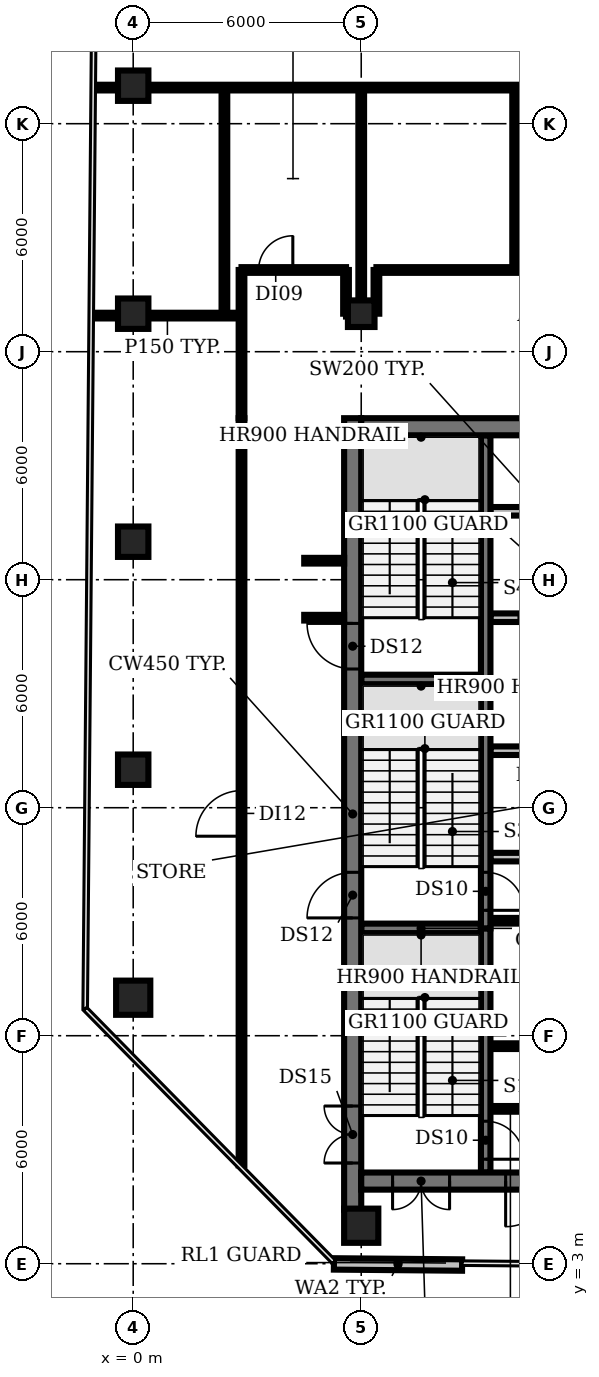
"""IFC4 building model, lengths in metres.
Left out: names, types, materials, properties, quantities, classifications, styles, units other than length and angle.
Written with IfcOpenShell. Run it as: python <this file> out.ifc"""

import sys

from ifc_helpers import new_model, si_unit, direction, frame, frame_2d, origin, origin_2d, place, context, subcontext, project, spatial, rectangle, circle, extrude, element, fill, save


model = new_model("IFC4")
c1 = context("Model", 3, precision=1e-05, world=origin(), true_north=direction((0.0, 1.0)))
c2 = subcontext(c1, "Body", "Model", "MODEL_VIEW")
j1 = project(units=[si_unit("LENGTHUNIT", "METRE"), si_unit("PLANEANGLEUNIT", "RADIAN")], contexts=[c1])
p1 = place(None, origin())
s1 = spatial("IfcSite", under=j1, at=p1, CompositionType="ELEMENT")
p2 = place(p1, origin())
s2 = spatial("IfcBuilding", under=s1, at=p2, CompositionType="ELEMENT")
p3 = place(p2, frame((0.0, 0.0, 230.6)))
s3 = spatial("IfcBuildingStorey", under=s2, at=p3, CompositionType="ELEMENT", Elevation=230.6)
p4 = place(p3, frame((0.0, 10.0, 0.0), z_axis=(0.0, 0.0, 1.0), x_axis=(1.0, 0.0, 0.0)))
e1 = element("IfcColumn", 1, at=p4, inside=s3, PredefinedType="COLUMN", context=c2, shape_type="SweptSolid", body=[
    extrude(circle(Radius=0.45, at=origin_2d()), origin(), (0.0, 0.0, 1.0), 3.85),
])
for number, where, z_axis, x_axis in (
    (2, (0.0, 16.0, 0.0), (0.0, 0.0, 1.0), (1.0, 0.0, 0.0)),
    (3, (0.0, 22.0, 0.0), (0.0, 0.0, 1.0), (1.0, 0.0, 0.0)),
    (4, (0.0, 28.0, 0.0), (0.0, 0.0, 1.0), (1.0, 0.0, 0.0)),
    (5, (0.0, 34.0, 0.0), (0.0, 0.0, 1.0), (1.0, 0.0, 0.0)),
):
    element("IfcColumn", number, at=place(p3, frame(where, z_axis=z_axis, x_axis=x_axis)), inside=s3, PredefinedType="COLUMN", context=c2, shape_type="SweptSolid", body=[
        extrude(rectangle(XDim=0.8, YDim=0.8, at=origin_2d()), origin(), (0.0, 0.0, 1.0), 3.85),
    ])
p5 = place(p3, frame((6.0, 4.0, 0.0), z_axis=(0.0, 0.0, 1.0), x_axis=(1.0, 0.0, 0.0)))
e6 = element("IfcColumn", 6, at=p5, inside=s3, PredefinedType="COLUMN", context=c2, shape_type="SweptSolid", body=[
    extrude(circle(Radius=0.45, at=origin_2d()), origin(), (0.0, 0.0, 1.0), 3.85),
])
p6 = place(p3, frame((6.0, 28.0, 0.0), z_axis=(0.0, 0.0, 1.0), x_axis=(1.0, 0.0, 0.0)))
e7 = element("IfcColumn", 7, at=p6, inside=s3, PredefinedType="COLUMN", context=c2, shape_type="SweptSolid", body=[
    extrude(rectangle(XDim=0.7, YDim=0.7, at=origin_2d()), origin(), (0.0, 0.0, 1.0), 3.85),
])
p7 = place(p3, frame((5.281, 2.995, 0.0), z_axis=(0.0, 0.0, 1.0), x_axis=(0.999962277007, -0.008685882971, 0.0)))
e8 = element("IfcWall", 8, at=p7, inside=s3, PredefinedType="SOLIDWALL", context=c2, shape_type="SweptSolid", body=[
    extrude(rectangle(XDim=3.373, YDim=0.3, at=frame_2d((1.687, 0.0))), origin(), (0.0, 0.0, 1.0), 3.85),
])
for number, where, z_axis, x_axis in (
    (9, (9.4, 7.075, 0.0), (0.0, 0.0, 1.0), (1.0, 0.0, 0.0)),
    (10, (9.4, 8.725, 0.0), (0.0, 0.0, 1.0), (1.0, 0.0, 0.0)),
    (11, (9.4, 10.375, 0.0), (0.0, 0.0, 1.0), (1.0, 0.0, 0.0)),
):
    element("IfcWall", number, at=place(p3, frame(where, z_axis=z_axis, x_axis=x_axis)), inside=s3, PredefinedType="SHEAR", context=c2, shape_type="SweptSolid", body=[
        extrude(rectangle(XDim=1.05, YDim=0.15, at=frame_2d((0.525, 0.0))), origin(), (0.0, 0.0, 1.0), 3.85),
    ])
p8 = place(p3, frame((6.0, 11.825, 0.0), z_axis=(0.0, 0.0, 1.0), x_axis=(1.0, 0.0, 0.0)))
e12 = element("IfcWall", 12, at=p8, inside=s3, PredefinedType="SHEAR", context=c2, shape_type="SweptSolid", body=[
    extrude(rectangle(XDim=3.15, YDim=0.25, at=frame_2d((1.575, 0.0))), origin(), (0.0, 0.0, 1.0), 3.85),
])
p9 = place(p3, frame((9.4, 12.025, 0.0), z_axis=(0.0, 0.0, 1.0), x_axis=(1.0, 0.0, 0.0)))
e13 = element("IfcWall", 13, at=p9, inside=s3, PredefinedType="SHEAR", context=c2, shape_type="SweptSolid", body=[
    extrude(rectangle(XDim=1.05, YDim=0.15, at=frame_2d((0.525, 0.0))), origin(), (0.0, 0.0, 1.0), 3.85),
])
p10 = place(p3, frame((9.4, 13.7, 0.0), z_axis=(0.0, 0.0, 1.0), x_axis=(1.0, 0.0, 0.0)))
e14 = element("IfcWall", 14, at=p10, inside=s3, PredefinedType="PARTITIONING", context=c2, shape_type="SweptSolid", body=[
    extrude(rectangle(XDim=4.0, YDim=0.225, at=frame_2d((2.0, 0.0))), origin(), (0.0, 0.0, 1.0), 3.85),
])
p11 = place(p3, frame((9.4, 16.5, 0.0), z_axis=(0.0, 0.0, 1.0), x_axis=(1.0, 0.0, 0.0)))
e15 = element("IfcWall", 15, at=p11, inside=s3, PredefinedType="PARTITIONING", context=c2, shape_type="SweptSolid", body=[
    extrude(rectangle(XDim=14.6, YDim=0.225, at=frame_2d((7.3, 0.0))), origin(), (0.0, 0.0, 1.0), 3.85),
])
p12 = place(p11, frame((0.85, 0.0, 0.0)))
e16 = element("IfcOpeningElement", 16, at=p12, cuts=e15, PredefinedType="OPENING", context=c2, shape_type="SweptSolid", body=[
    extrude(rectangle(XDim=0.9, YDim=2.1, at=frame_2d((0.45, 1.05))), frame((0.0, 0.123, 0.0), z_axis=(0.0, -1.0, 0.0), x_axis=(1.0, 0.0, 0.0)), (0.0, 0.0, 1.0), 0.245),
])
p13 = place(p11, frame((3.625, 0.0, 0.0)))
e17 = element("IfcOpeningElement", 17, at=p13, cuts=e15, PredefinedType="OPENING", context=c2, shape_type="SweptSolid", body=[
    extrude(rectangle(XDim=0.9, YDim=2.1, at=frame_2d((0.45, 1.05))), frame((0.0, 0.123, 0.0), z_axis=(0.0, -1.0, 0.0), x_axis=(1.0, 0.0, 0.0)), (0.0, 0.0, 1.0), 0.245),
])
p14 = place(p11, frame((7.775, 0.0, 0.0)))
e18 = element("IfcOpeningElement", 18, at=p14, cuts=e15, PredefinedType="OPENING", context=c2, shape_type="SweptSolid", body=[
    extrude(rectangle(XDim=1.0, YDim=2.1, at=frame_2d((0.5, 1.05))), frame((0.0, 0.123, 0.0), z_axis=(0.0, -1.0, 0.0), x_axis=(1.0, 0.0, 0.0)), (0.0, 0.0, 1.0), 0.245),
])
p15 = place(p11, frame((12.4, 0.0, 0.0)))
e19 = element("IfcOpeningElement", 19, at=p15, cuts=e15, PredefinedType="OPENING", context=c2, shape_type="SweptSolid", body=[
    extrude(rectangle(XDim=1.0, YDim=2.1, at=frame_2d((0.5, 1.05))), frame((0.0, 0.123, 0.0), z_axis=(0.0, -1.0, 0.0), x_axis=(1.0, 0.0, 0.0)), (0.0, 0.0, 1.0), 0.245),
])
p16 = place(p3, frame((6.0, 18.375, 0.0), z_axis=(0.0, 0.0, 1.0), x_axis=(1.0, 0.0, 0.0)))
e20 = element("IfcWall", 20, at=p16, inside=s3, PredefinedType="SHEAR", context=c2, shape_type="SweptSolid", body=[
    extrude(rectangle(XDim=3.15, YDim=0.25, at=frame_2d((1.575, 0.0))), origin(), (0.0, 0.0, 1.0), 3.85),
])
p17 = place(p3, frame((24.0, 20.0, 0.0), z_axis=(0.0, 0.0, 1.0), x_axis=(-1.0, 0.0, 0.0)))
e21 = element("IfcWall", 21, at=p17, inside=s3, PredefinedType="PARTITIONING", context=c2, shape_type="SweptSolid", body=[
    extrude(rectangle(XDim=14.6, YDim=0.225, at=frame_2d((7.3, 0.0))), origin(), (0.0, 0.0, 1.0), 3.85),
])
p18 = place(p17, frame((12.75, 0.0, 0.0)))
e22 = element("IfcOpeningElement", 22, at=p18, cuts=e21, PredefinedType="OPENING", context=c2, shape_type="SweptSolid", body=[
    extrude(rectangle(XDim=1.1, YDim=2.1, at=frame_2d((0.55, 1.05))), frame((0.0, 0.123, 0.0), z_axis=(0.0, -1.0, 0.0), x_axis=(1.0, 0.0, 0.0)), (0.0, 0.0, 1.0), 0.245),
])
p19 = place(p17, frame((9.95, 0.0, 0.0)))
e23 = element("IfcOpeningElement", 23, at=p19, cuts=e21, PredefinedType="OPENING", context=c2, shape_type="SweptSolid", body=[
    extrude(rectangle(XDim=1.1, YDim=2.1, at=frame_2d((0.55, 1.05))), frame((0.0, 0.123, 0.0), z_axis=(0.0, -1.0, 0.0), x_axis=(1.0, 0.0, 0.0)), (0.0, 0.0, 1.0), 0.245),
])
p20 = place(p17, frame((7.15, 0.0, 0.0)))
e24 = element("IfcOpeningElement", 24, at=p20, cuts=e21, PredefinedType="OPENING", context=c2, shape_type="SweptSolid", body=[
    extrude(rectangle(XDim=1.1, YDim=2.1, at=frame_2d((0.55, 1.05))), frame((0.0, 0.123, 0.0), z_axis=(0.0, -1.0, 0.0), x_axis=(1.0, 0.0, 0.0)), (0.0, 0.0, 1.0), 0.245),
])
p21 = place(p17, frame((4.35, 0.0, 0.0)))
e25 = element("IfcOpeningElement", 25, at=p21, cuts=e21, PredefinedType="OPENING", context=c2, shape_type="SweptSolid", body=[
    extrude(rectangle(XDim=1.1, YDim=2.1, at=frame_2d((0.55, 1.05))), frame((0.0, 0.123, 0.0), z_axis=(0.0, -1.0, 0.0), x_axis=(1.0, 0.0, 0.0)), (0.0, 0.0, 1.0), 0.245),
])
p22 = place(p17, frame((1.2, 0.0, 0.0)))
e26 = element("IfcOpeningElement", 26, at=p22, cuts=e21, PredefinedType="OPENING", context=c2, shape_type="SweptSolid", body=[
    extrude(rectangle(XDim=1.0, YDim=2.1, at=frame_2d((0.5, 1.05))), frame((0.0, 0.123, 0.0), z_axis=(0.0, -1.0, 0.0), x_axis=(1.0, 0.0, 0.0)), (0.0, 0.0, 1.0), 0.245),
])
p23 = place(p3, frame((9.4, 22.8, 0.0), z_axis=(0.0, 0.0, 1.0), x_axis=(1.0, 0.0, 0.0)))
e27 = element("IfcWall", 27, at=p23, inside=s3, PredefinedType="PARTITIONING", context=c2, shape_type="SweptSolid", body=[
    extrude(rectangle(XDim=14.6, YDim=0.225, at=frame_2d((7.3, 0.0))), origin(), (0.0, 0.0, 1.0), 3.85),
])
p24 = place(p3, frame((9.275, 11.825, 0.0), z_axis=(0.0, 0.0, 1.0), x_axis=(0.0, -1.0, 0.0)))
e28 = element("IfcWall", 28, at=p24, inside=s3, PredefinedType="SHEAR", context=c2, shape_type="SweptSolid", body=[
    extrude(rectangle(XDim=6.425, YDim=0.25, at=frame_2d((3.212, 0.0))), origin(), (0.0, 0.0, 1.0), 3.85),
])
p25 = place(p24, frame((5.075, 0.0, 0.0)))
e29 = element("IfcOpeningElement", 29, at=p25, cuts=e28, PredefinedType="OPENING", context=c2, shape_type="SweptSolid", body=[
    extrude(rectangle(XDim=1.0, YDim=2.1, at=frame_2d((0.5, 1.05))), frame((0.0, 0.135, 0.0), z_axis=(0.0, -1.0, 0.0), x_axis=(1.0, 0.0, 0.0)), (0.0, 0.0, 1.0), 0.27),
])
p26 = place(p3, frame((9.275, 18.375, 0.0), z_axis=(0.0, 0.0, 1.0), x_axis=(0.0, -1.0, 0.0)))
e30 = element("IfcWall", 30, at=p26, inside=s3, PredefinedType="SHEAR", context=c2, shape_type="SweptSolid", body=[
    extrude(rectangle(XDim=6.55, YDim=0.25, at=frame_2d((3.275, 0.0))), origin(), (0.0, 0.0, 1.0), 3.85),
])
p27 = place(p26, frame((5.075, 0.0, 0.0)))
e31 = element("IfcOpeningElement", 31, at=p27, cuts=e30, PredefinedType="OPENING", context=c2, shape_type="SweptSolid", body=[
    extrude(rectangle(XDim=1.0, YDim=2.1, at=frame_2d((0.5, 1.05))), frame((0.0, 0.135, 0.0), z_axis=(0.0, -1.0, 0.0), x_axis=(1.0, 0.0, 0.0)), (0.0, 0.0, 1.0), 0.27),
])
p28 = place(p3, frame((9.275, 18.375, 0.0), z_axis=(0.0, 0.0, 1.0), x_axis=(0.0, 1.0, 0.0)))
e32 = element("IfcWall", 32, at=p28, inside=s3, PredefinedType="SHEAR", context=c2, shape_type="SweptSolid", body=[
    extrude(rectangle(XDim=6.425, YDim=0.25, at=frame_2d((3.212, 0.0))), origin(), (0.0, 0.0, 1.0), 3.85),
])
p29 = place(p3, frame((5.775, 4.42, 0.0), z_axis=(0.0, 0.0, 1.0), x_axis=(0.0, 1.0, 0.0)))
e33 = element("IfcWall", 33, at=p29, inside=s3, PredefinedType="SHEAR", context=c2, shape_type="SweptSolid", body=[
    extrude(rectangle(XDim=20.83, YDim=0.45, at=frame_2d((10.415, 0.0))), origin(), (0.0, 0.0, 1.0), 3.85),
])
p30 = place(p29, frame((1.23, 0.0, 0.0)))
e34 = element("IfcOpeningElement", 34, at=p30, cuts=e33, PredefinedType="OPENING", context=c2, shape_type="SweptSolid", body=[
    extrude(rectangle(XDim=1.5, YDim=2.1, at=frame_2d((0.75, 1.05))), frame((0.0, 0.235, 0.0), z_axis=(0.0, -1.0, 0.0), x_axis=(1.0, 0.0, 0.0)), (0.0, 0.0, 1.0), 0.47),
])
p31 = place(p29, frame((7.68, 0.0, 0.0)))
e35 = element("IfcOpeningElement", 35, at=p31, cuts=e33, PredefinedType="OPENING", context=c2, shape_type="SweptSolid", body=[
    extrude(rectangle(XDim=1.2, YDim=2.1, at=frame_2d((0.6, 1.05))), frame((0.0, 0.235, 0.0), z_axis=(0.0, -1.0, 0.0), x_axis=(1.0, 0.0, 0.0)), (0.0, 0.0, 1.0), 0.47),
])
p32 = place(p29, frame((14.23, 0.0, 0.0)))
e36 = element("IfcOpeningElement", 36, at=p32, cuts=e33, PredefinedType="OPENING", context=c2, shape_type="SweptSolid", body=[
    extrude(rectangle(XDim=1.2, YDim=2.1, at=frame_2d((0.6, 1.05))), frame((0.0, 0.235, 0.0), z_axis=(0.0, -1.0, 0.0), x_axis=(1.0, 0.0, 0.0)), (0.0, 0.0, 1.0), 0.47),
])
p33 = place(p3, frame((24.0, 5.175, 0.0), z_axis=(0.0, 0.0, 1.0), x_axis=(-1.0, 0.0, 0.0)))
e37 = element("IfcWall", 37, at=p33, inside=s3, PredefinedType="SHEAR", context=c2, shape_type="SweptSolid", body=[
    extrude(rectangle(XDim=18.0, YDim=0.45, at=frame_2d((9.0, 0.0))), origin(), (0.0, 0.0, 1.0), 3.85),
])
p34 = place(p33, frame((0.825, 0.0, 0.0)))
e38 = element("IfcOpeningElement", 38, at=p34, cuts=e37, PredefinedType="OPENING", context=c2, shape_type="SweptSolid", body=[
    extrude(rectangle(XDim=1.5, YDim=2.1, at=frame_2d((0.75, 1.05))), frame((0.0, 0.235, 0.0), z_axis=(0.0, -1.0, 0.0), x_axis=(1.0, 0.0, 0.0)), (0.0, 0.0, 1.0), 0.47),
])
p35 = place(p33, frame((15.675, 0.0, 0.0)))
e39 = element("IfcOpeningElement", 39, at=p35, cuts=e37, PredefinedType="OPENING", context=c2, shape_type="SweptSolid", body=[
    extrude(rectangle(XDim=1.5, YDim=2.1, at=frame_2d((0.75, 1.05))), frame((0.0, 0.235, 0.0), z_axis=(0.0, -1.0, 0.0), x_axis=(1.0, 0.0, 0.0)), (0.0, 0.0, 1.0), 0.47),
])
p36 = place(p33, frame((13.0, 0.0, 0.0)))
e40 = element("IfcOpeningElement", 40, at=p36, cuts=e37, PredefinedType="OPENING", context=c2, shape_type="SweptSolid", body=[
    extrude(rectangle(XDim=1.2, YDim=2.1, at=frame_2d((0.6, 1.05))), frame((0.0, 0.235, 0.0), z_axis=(0.0, -1.0, 0.0), x_axis=(1.0, 0.0, 0.0)), (0.0, 0.0, 1.0), 0.47),
])
p37 = place(p33, frame((4.4, 0.0, 0.0)))
e41 = element("IfcOpeningElement", 41, at=p37, cuts=e37, PredefinedType="OPENING", context=c2, shape_type="SweptSolid", body=[
    extrude(rectangle(XDim=1.0, YDim=2.1, at=frame_2d((0.5, 1.05))), frame((0.0, 0.235, 0.0), z_axis=(0.0, -1.0, 0.0), x_axis=(1.0, 0.0, 0.0)), (0.0, 0.0, 1.0), 0.47),
])
p38 = place(p3, frame((6.0, 25.025, 0.0), z_axis=(0.0, 0.0, 1.0), x_axis=(1.0, 0.0, 0.0)))
e42 = element("IfcWall", 42, at=p38, inside=s3, PredefinedType="SHEAR", context=c2, shape_type="SweptSolid", body=[
    extrude(rectangle(XDim=18.0, YDim=0.45, at=frame_2d((9.0, 0.0))), origin(), (0.0, 0.0, 1.0), 3.85),
])
p39 = place(p3, frame((-1.05, 27.95, 0.0), z_axis=(0.0, 0.0, 1.0), x_axis=(1.0, 0.0, 0.0)))
e43 = element("IfcWall", 43, at=p39, inside=s3, PredefinedType="PARTITIONING", context=c2, shape_type="SweptSolid", body=[
    extrude(rectangle(XDim=3.9, YDim=0.15, at=frame_2d((1.95, 0.0))), origin(), (0.0, 0.0, 1.0), 2.88),
])
p40 = place(p3, frame((-1.0, 33.95, 0.0), z_axis=(0.0, 0.0, 1.0), x_axis=(1.0, 0.0, 0.0)))
e44 = element("IfcWall", 44, at=p40, inside=s3, PredefinedType="PARTITIONING", context=c2, shape_type="SweptSolid", body=[
    extrude(rectangle(XDim=14.65, YDim=0.15, at=frame_2d((7.325, 0.0))), origin(), (0.0, 0.0, 1.0), 2.88),
])
p41 = place(p3, frame((2.4, 27.95, 0.0), z_axis=(0.0, 0.0, 1.0), x_axis=(0.0, 1.0, 0.0)))
e45 = element("IfcWall", 45, at=p41, inside=s3, PredefinedType="PARTITIONING", context=c2, shape_type="SweptSolid", body=[
    extrude(rectangle(XDim=6.0, YDim=0.15, at=frame_2d((3.0, 0.0))), origin(), (0.0, 0.0, 1.0), 2.88),
])
p42 = place(p3, frame((2.85, 5.59, 0.0), z_axis=(0.0, 0.0, 1.0), x_axis=(0.0, 1.0, 0.0)))
e46 = element("IfcWall", 46, at=p42, inside=s3, PredefinedType="PARTITIONING", context=c2, shape_type="SweptSolid", body=[
    extrude(rectangle(XDim=19.66, YDim=0.15, at=frame_2d((9.83, 0.0))), origin(), (0.0, 0.0, 1.0), 2.88),
])
p43 = place(p42, frame((8.66, 0.0, 0.0)))
e47 = element("IfcOpeningElement", 47, at=p43, cuts=e46, PredefinedType="OPENING", context=c2, shape_type="SweptSolid", body=[
    extrude(rectangle(XDim=1.2, YDim=2.1, at=frame_2d((0.6, 1.05))), frame((0.0, 0.085, 0.0), z_axis=(0.0, -1.0, 0.0), x_axis=(1.0, 0.0, 0.0)), (0.0, 0.0, 1.0), 0.17),
])
p44 = place(p3, frame((2.85, 25.25, 0.0), z_axis=(0.0, 0.0, 1.0), x_axis=(0.0, 1.0, 0.0)))
e48 = element("IfcWall", 48, at=p44, inside=s3, PredefinedType="PARTITIONING", context=c2, shape_type="SweptSolid", body=[
    extrude(rectangle(XDim=3.9, YDim=0.15, at=frame_2d((1.95, 0.0))), origin(), (0.0, 0.0, 1.0), 2.88),
])
p45 = place(p3, frame((2.85, 29.15, 0.0), z_axis=(0.0, 0.0, 1.0), x_axis=(1.0, 0.0, 0.0)))
e49 = element("IfcWall", 49, at=p45, inside=s3, PredefinedType="PARTITIONING", context=c2, shape_type="SweptSolid", body=[
    extrude(rectangle(XDim=2.75, YDim=0.15, at=frame_2d((1.375, 0.0))), origin(), (0.0, 0.0, 1.0), 2.88),
])
p46 = place(p45, frame((0.45, 0.0, 0.0)))
e50 = element("IfcOpeningElement", 50, at=p46, cuts=e49, PredefinedType="OPENING", context=c2, shape_type="SweptSolid", body=[
    extrude(rectangle(XDim=0.9, YDim=2.1, at=frame_2d((0.45, 1.05))), frame((0.0, 0.085, 0.0), z_axis=(0.0, -1.0, 0.0), x_axis=(1.0, 0.0, 0.0)), (0.0, 0.0, 1.0), 0.17),
])
for number, where, z_axis, x_axis in (
    (51, (4.5, 20.0, 0.0), (0.0, 0.0, 1.0), (1.0, 0.0, 0.0)),
    (52, (4.5, 21.5, 0.0), (0.0, 0.0, 1.0), (1.0, 0.0, 0.0)),
):
    element("IfcWall", number, at=place(p3, frame(where, z_axis=z_axis, x_axis=x_axis)), inside=s3, PredefinedType="PARTITIONING", context=c2, shape_type="SweptSolid", body=[
        extrude(rectangle(XDim=1.05, YDim=0.15, at=frame_2d((0.525, 0.0))), origin(), (0.0, 0.0, 1.0), 2.88),
    ])
p47 = place(p3, frame((5.6, 28.0, 0.0), z_axis=(0.0, 0.0, 1.0), x_axis=(0.0, 1.0, 0.0)))
e53 = element("IfcWall", 53, at=p47, inside=s3, PredefinedType="PARTITIONING", context=c2, shape_type="SweptSolid", body=[
    extrude(rectangle(XDim=1.15, YDim=0.15, at=frame_2d((0.575, 0.0))), origin(), (0.0, 0.0, 1.0), 2.88),
])
p48 = place(p3, frame((5.6, 28.0, 0.0), z_axis=(0.0, 0.0, 1.0), x_axis=(1.0, 0.0, 0.0)))
e54 = element("IfcWall", 54, at=p48, inside=s3, PredefinedType="PARTITIONING", context=c2, shape_type="SweptSolid", body=[
    extrude(rectangle(XDim=0.4, YDim=0.15, at=frame_2d((0.2, 0.0))), origin(), (0.0, 0.0, 1.0), 2.88),
])
p49 = place(p3, frame((6.0, 28.0, 0.0), z_axis=(0.0, 0.0, 1.0), x_axis=(0.0, 1.0, 0.0)))
e55 = element("IfcWall", 55, at=p49, inside=s3, PredefinedType="PARTITIONING", context=c2, shape_type="SweptSolid", body=[
    extrude(rectangle(XDim=5.95, YDim=0.15, at=frame_2d((2.975, 0.0))), origin(), (0.0, 0.0, 1.0), 2.88),
])
p50 = place(p3, frame((6.4, 28.0, 0.0), z_axis=(0.0, 0.0, 1.0), x_axis=(0.0, 1.0, 0.0)))
e56 = element("IfcWall", 56, at=p50, inside=s3, PredefinedType="PARTITIONING", context=c2, shape_type="SweptSolid", body=[
    extrude(rectangle(XDim=1.15, YDim=0.15, at=frame_2d((0.575, 0.0))), origin(), (0.0, 0.0, 1.0), 2.88),
])
p51 = place(p3, frame((6.4, 29.15, 0.0), z_axis=(0.0, 0.0, 1.0), x_axis=(1.0, 0.0, 0.0)))
e57 = element("IfcWall", 57, at=p51, inside=s3, PredefinedType="PARTITIONING", context=c2, shape_type="SweptSolid", body=[
    extrude(rectangle(XDim=7.25, YDim=0.15, at=frame_2d((3.625, 0.0))), origin(), (0.0, 0.0, 1.0), 2.88),
])
p52 = place(p3, frame((10.05, 29.15, 0.0), z_axis=(0.0, 0.0, 1.0), x_axis=(0.0, 1.0, 0.0)))
e58 = element("IfcWall", 58, at=p52, inside=s3, PredefinedType="PARTITIONING", context=c2, shape_type="SweptSolid", body=[
    extrude(rectangle(XDim=4.8, YDim=0.15, at=frame_2d((2.4, 0.0))), origin(), (0.0, 0.0, 1.0), 2.88),
])
p53 = place(p25, origin())
e59 = element("IfcDoor", 59, at=p53, inside=s3, OperationType="SINGLE_SWING_RIGHT", PredefinedType="DOOR", context=c2, shape_type="SweptSolid", body=[
    extrude(rectangle(XDim=1.0, YDim=2.1, at=frame_2d((0.5, 1.05))), frame((0.0, 0.025, 0.0), z_axis=(0.0, -1.0, 0.0), x_axis=(1.0, 0.0, 0.0)), (0.0, 0.0, 1.0), 0.05),
])
fill(e29, e59)
p54 = place(p27, origin())
e60 = element("IfcDoor", 60, at=p54, inside=s3, OperationType="SINGLE_SWING_RIGHT", PredefinedType="DOOR", context=c2, shape_type="SweptSolid", body=[
    extrude(rectangle(XDim=1.0, YDim=2.1, at=frame_2d((0.5, 1.05))), frame((0.0, 0.025, 0.0), z_axis=(0.0, -1.0, 0.0), x_axis=(1.0, 0.0, 0.0)), (0.0, 0.0, 1.0), 0.05),
])
fill(e31, e60)
p55 = place(p30, origin())
e61 = element("IfcDoor", 61, at=p55, inside=s3, OperationType="DOUBLE_DOOR_SINGLE_SWING", PredefinedType="DOOR", context=c2, shape_type="SweptSolid", body=[
    extrude(rectangle(XDim=1.5, YDim=2.1, at=frame_2d((0.75, 1.05))), frame((0.0, 0.025, 0.0), z_axis=(0.0, -1.0, 0.0), x_axis=(1.0, 0.0, 0.0)), (0.0, 0.0, 1.0), 0.05),
])
fill(e34, e61)
p56 = place(p31, origin())
e62 = element("IfcDoor", 62, at=p56, inside=s3, OperationType="SINGLE_SWING_LEFT", PredefinedType="DOOR", context=c2, shape_type="SweptSolid", body=[
    extrude(rectangle(XDim=1.2, YDim=2.1, at=frame_2d((0.6, 1.05))), frame((0.0, 0.025, 0.0), z_axis=(0.0, -1.0, 0.0), x_axis=(1.0, 0.0, 0.0)), (0.0, 0.0, 1.0), 0.05),
])
fill(e35, e62)
p57 = place(p32, origin())
e63 = element("IfcDoor", 63, at=p57, inside=s3, OperationType="SINGLE_SWING_RIGHT", PredefinedType="DOOR", context=c2, shape_type="SweptSolid", body=[
    extrude(rectangle(XDim=1.2, YDim=2.1, at=frame_2d((0.6, 1.05))), frame((0.0, 0.025, 0.0), z_axis=(0.0, -1.0, 0.0), x_axis=(1.0, 0.0, 0.0)), (0.0, 0.0, 1.0), 0.05),
])
fill(e36, e63)
p58 = place(p35, origin())
e64 = element("IfcDoor", 64, at=p58, inside=s3, OperationType="DOUBLE_DOOR_SINGLE_SWING", PredefinedType="DOOR", context=c2, shape_type="SweptSolid", body=[
    extrude(rectangle(XDim=1.5, YDim=2.1, at=frame_2d((0.75, 1.05))), frame((0.0, 0.025, 0.0), z_axis=(0.0, -1.0, 0.0), x_axis=(1.0, 0.0, 0.0)), (0.0, 0.0, 1.0), 0.05),
])
fill(e39, e64)
p59 = place(p36, origin())
e65 = element("IfcDoor", 65, at=p59, inside=s3, OperationType="SINGLE_SWING_RIGHT", PredefinedType="DOOR", context=c2, shape_type="SweptSolid", body=[
    extrude(rectangle(XDim=1.2, YDim=2.1, at=frame_2d((0.6, 1.05))), frame((0.0, 0.025, 0.0), z_axis=(0.0, -1.0, 0.0), x_axis=(1.0, 0.0, 0.0)), (0.0, 0.0, 1.0), 0.05),
])
fill(e40, e65)
p60 = place(p43, origin())
e66 = element("IfcDoor", 66, at=p60, inside=s3, OperationType="SINGLE_SWING_LEFT", PredefinedType="DOOR", context=c2, shape_type="SweptSolid", body=[
    extrude(rectangle(XDim=1.2, YDim=2.1, at=frame_2d((0.6, 1.05))), frame((0.0, 0.025, 0.0), z_axis=(0.0, -1.0, 0.0), x_axis=(1.0, 0.0, 0.0)), (0.0, 0.0, 1.0), 0.05),
])
fill(e47, e66)
p61 = place(p46, origin())
e67 = element("IfcDoor", 67, at=p61, inside=s3, OperationType="SINGLE_SWING_RIGHT", PredefinedType="DOOR", context=c2, shape_type="SweptSolid", body=[
    extrude(rectangle(XDim=0.9, YDim=2.1, at=frame_2d((0.45, 1.05))), frame((0.0, 0.025, 0.0), z_axis=(0.0, -1.0, 0.0), x_axis=(1.0, 0.0, 0.0)), (0.0, 0.0, 1.0), 0.05),
])
fill(e50, e67)
save(model, sys.argv[1])
